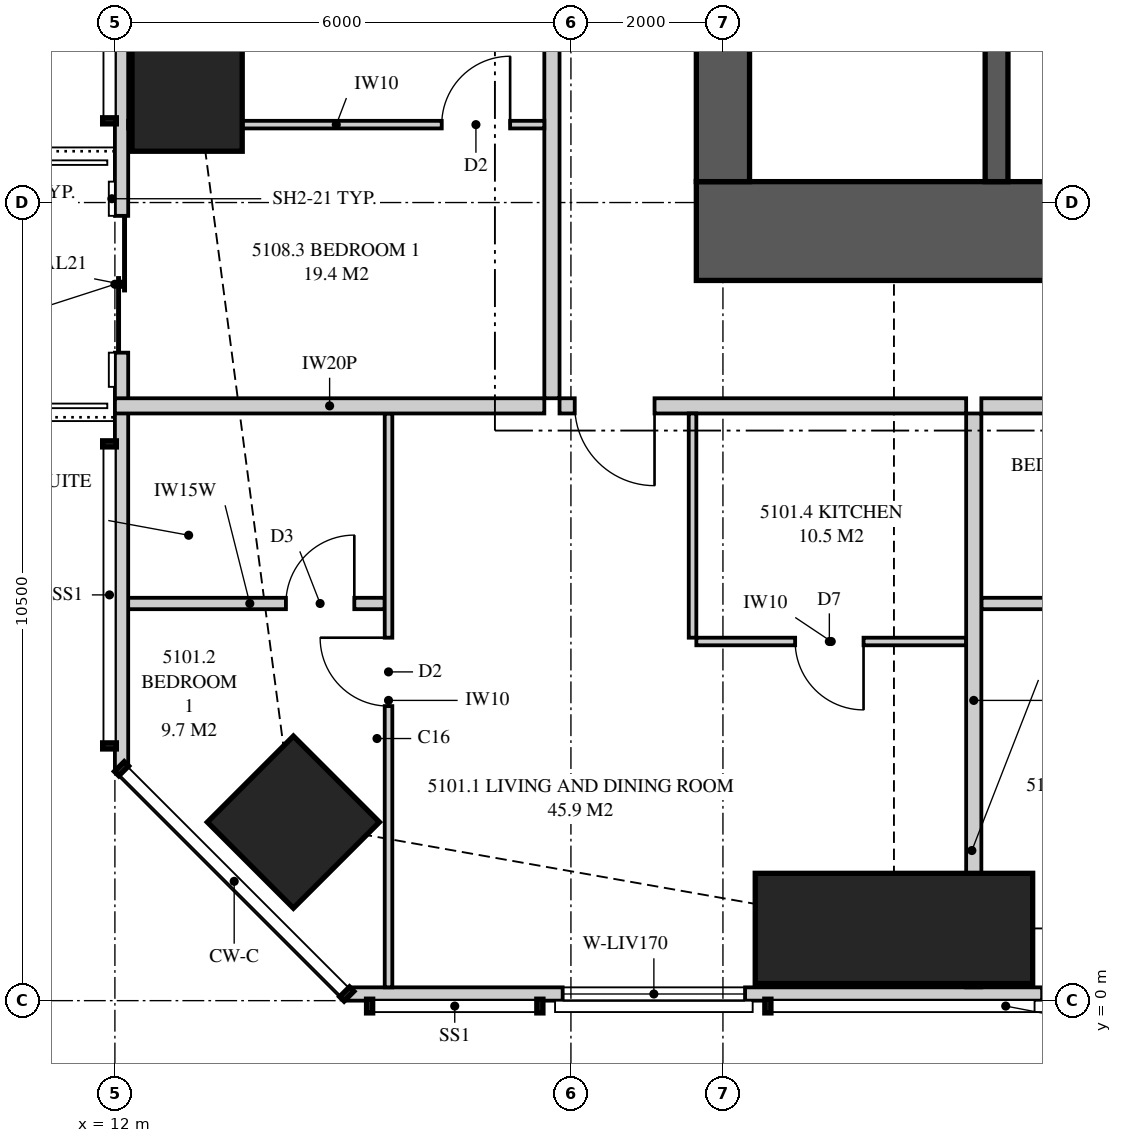
"""IFC4 building model, lengths in metres.
Left out: names, types, materials, properties, quantities, classifications, styles, units other than length and angle.
Written with IfcOpenShell. Run it as: python <this file> out.ifc"""

import sys

from ifc_helpers import new_model, si_unit, direction, frame, frame_2d, origin, origin_2d, place, context, subcontext, project, spatial, polyline, rectangle, outline, extrude, element, fill, save


model = new_model("IFC4")
c1 = context("Model", 3, precision=1e-05, world=origin(), true_north=direction((0.0, 1.0)))
c2 = subcontext(c1, "Body", "Model", "MODEL_VIEW")
j1 = project(units=[si_unit("LENGTHUNIT", "METRE"), si_unit("PLANEANGLEUNIT", "RADIAN")], contexts=[c1])
p1 = place(None, origin())
s1 = spatial("IfcSite", under=j1, at=p1, CompositionType="ELEMENT")
p2 = place(p1, origin())
s2 = spatial("IfcBuilding", under=s1, at=p2, CompositionType="ELEMENT")
p3 = place(p2, frame((0.0, 0.0, 187.85)))
s3 = spatial("IfcBuildingStorey", under=s2, at=p3, CompositionType="ELEMENT", Elevation=187.85)
p4 = place(p3, frame((14.348, 2.348, 0.0), z_axis=(0.0, 0.0, 1.0), x_axis=(0.707106781187, 0.707106781187, 0.0)))
e1 = element("IfcColumn", 1, at=p4, inside=s3, PredefinedType="COLUMN", context=c2, shape_type="SweptSolid", body=[
    extrude(rectangle(XDim=1.6, YDim=1.6, at=origin_2d()), origin(), (0.0, 0.0, 1.0), 3.35),
])
for number, where, z_axis, x_axis in (
    (2, (22.25, 0.95, 0.0), (0.0, 0.0, 1.0), (0.0, 1.0, 0.0)),
    (3, (12.95, 13.0, 0.0), (0.0, 0.0, 1.0), (1.0, 0.0, 0.0)),
):
    element("IfcColumn", number, at=place(p3, frame(where, z_axis=z_axis, x_axis=x_axis)), inside=s3, PredefinedType="COLUMN", context=c2, shape_type="SweptSolid", body=[
        extrude(rectangle(XDim=1.45, YDim=3.65, at=origin_2d()), origin(), (0.0, 0.0, 1.0), 3.35),
    ])
p5 = place(p3, frame((19.65, 10.125, 0.0), z_axis=(0.0, 0.0, 1.0), x_axis=(1.0, 0.0, 0.0)))
e4 = element("IfcWall", 4, at=p5, inside=s3, PredefinedType="SHEAR", context=c2, shape_type="SweptSolid", body=[
    extrude(rectangle(XDim=6.35, YDim=1.3, at=frame_2d((3.175, 0.0))), origin(), (0.0, 0.0, 1.0), 3.35),
])
p6 = place(p5, frame((4.775, 0.0, 0.0)))
e5 = element("IfcOpeningElement", 5, at=p6, cuts=e4, PredefinedType="OPENING", context=c2, shape_type="SweptSolid", body=[
    extrude(rectangle(XDim=0.75, YDim=2.1, at=frame_2d((0.375, 1.05))), frame((0.0, 0.66, 0.0), z_axis=(0.0, -1.0, 0.0), x_axis=(1.0, 0.0, 0.0)), (0.0, 0.0, 1.0), 1.32),
])
p7 = place(p3, frame((20.0, 13.0, 0.0), z_axis=(0.0, 0.0, 1.0), x_axis=(0.0, -1.0, 0.0)))
e6 = element("IfcWall", 6, at=p7, inside=s3, PredefinedType="SHEAR", context=c2, shape_type="SweptSolid", body=[
    extrude(rectangle(XDim=2.225, YDim=0.7, at=frame_2d((1.113, 0.0))), origin(), (0.0, 0.0, 1.0), 3.35),
])
p8 = place(p3, frame((23.6, 10.775, 0.0), z_axis=(0.0, 0.0, 1.0), x_axis=(0.0, 1.0, 0.0)))
e7 = element("IfcWall", 7, at=p8, inside=s3, PredefinedType="SHEAR", context=c2, shape_type="SweptSolid", body=[
    extrude(rectangle(XDim=6.925, YDim=0.3, at=frame_2d((3.462, 0.0))), origin(), (0.0, 0.0, 1.0), 3.35),
])
p9 = place(p3, frame((15.051, 0.087, 0.0), z_axis=(0.0, 0.0, 1.0), x_axis=(1.0, 0.0, 0.0)))
e8 = element("IfcWall", 8, at=p9, inside=s3, PredefinedType="SOLIDWALL", context=c2, shape_type="SweptSolid", body=[
    extrude(outline(polyline([(0.0, 0.0), (34.897, 0.0), (34.897, 3.11), (27.91, 3.11), (27.91, 2.15), (27.836, 2.15), (27.836, 3.11), (27.699, 3.11), (27.699, 2.15), (7.199, 2.15), (7.199, 3.11), (7.062, 3.11), (7.062, 2.15), (6.987, 2.15), (6.987, 3.11), (0.0, 3.11), (0.0, 0.0)])), frame((0.0, 0.087, 0.0), z_axis=(0.0, -1.0, 0.0), x_axis=(1.0, 0.0, 0.0)), (0.0, 0.0, 1.0), 0.175),
])
p10 = place(p9, frame((2.84, 0.0, 0.4)))
e9 = element("IfcOpeningElement", 9, at=p10, cuts=e8, PredefinedType="OPENING", context=c2, shape_type="SweptSolid", body=[
    extrude(rectangle(XDim=2.4, YDim=1.7, at=frame_2d((1.2, 0.85))), frame((0.0, 0.097, 0.0), z_axis=(0.0, -1.0, 0.0), x_axis=(1.0, 0.0, 0.0)), (0.0, 0.0, 1.0), 0.195),
])
p11 = place(p9, frame((9.149, 0.0, 0.4)))
e10 = element("IfcOpeningElement", 10, at=p11, cuts=e8, PredefinedType="OPENING", context=c2, shape_type="SweptSolid", body=[
    extrude(rectangle(XDim=1.8, YDim=1.7, at=frame_2d((0.9, 0.85))), frame((0.0, 0.097, 0.0), z_axis=(0.0, -1.0, 0.0), x_axis=(1.0, 0.0, 0.0)), (0.0, 0.0, 1.0), 0.195),
])
p12 = place(p9, frame((13.561, 0.0, 0.0)))
e11 = element("IfcOpeningElement", 11, at=p12, cuts=e8, PredefinedType="OPENING", context=c2, shape_type="SweptSolid", body=[
    extrude(rectangle(XDim=1.8, YDim=2.1, at=frame_2d((0.9, 1.05))), frame((0.0, 0.097, 0.0), z_axis=(0.0, -1.0, 0.0), x_axis=(1.0, 0.0, 0.0)), (0.0, 0.0, 1.0), 0.195),
])
p13 = place(p9, frame((19.849, 0.0, 0.4)))
e12 = element("IfcOpeningElement", 12, at=p13, cuts=e8, PredefinedType="OPENING", context=c2, shape_type="SweptSolid", body=[
    extrude(rectangle(XDim=1.8, YDim=1.7, at=frame_2d((0.9, 0.85))), frame((0.0, 0.097, 0.0), z_axis=(0.0, -1.0, 0.0), x_axis=(1.0, 0.0, 0.0)), (0.0, 0.0, 1.0), 0.195),
])
p14 = place(p9, frame((23.449, 0.0, 0.4)))
e13 = element("IfcOpeningElement", 13, at=p14, cuts=e8, PredefinedType="OPENING", context=c2, shape_type="SweptSolid", body=[
    extrude(rectangle(XDim=1.8, YDim=1.7, at=frame_2d((0.9, 0.85))), frame((0.0, 0.097, 0.0), z_axis=(0.0, -1.0, 0.0), x_axis=(1.0, 0.0, 0.0)), (0.0, 0.0, 1.0), 0.195),
])
p15 = place(p9, frame((29.636, 0.0, 0.4)))
e14 = element("IfcOpeningElement", 14, at=p15, cuts=e8, PredefinedType="OPENING", context=c2, shape_type="SweptSolid", body=[
    extrude(rectangle(XDim=1.8, YDim=1.7, at=frame_2d((0.9, 0.85))), frame((0.0, 0.097, 0.0), z_axis=(0.0, -1.0, 0.0), x_axis=(1.0, 0.0, 0.0)), (0.0, 0.0, 1.0), 0.195),
])
p16 = place(p9, frame((32.56, 0.0, 0.4)))
e15 = element("IfcOpeningElement", 15, at=p16, cuts=e8, PredefinedType="OPENING", context=c2, shape_type="SweptSolid", body=[
    extrude(rectangle(XDim=1.8, YDim=1.7, at=frame_2d((0.9, 0.85))), frame((0.0, 0.097, 0.0), z_axis=(0.0, -1.0, 0.0), x_axis=(1.0, 0.0, 0.0)), (0.0, 0.0, 1.0), 0.195),
])
p17 = place(p3, frame((12.087, 32.949, 0.0), z_axis=(0.0, 0.0, 1.0), x_axis=(0.0, -1.0, 0.0)))
e16 = element("IfcWall", 16, at=p17, inside=s3, PredefinedType="SOLIDWALL", context=c2, shape_type="SweptSolid", body=[
    extrude(outline(polyline([(0.0, 0.0), (29.897, 0.0), (29.897, 3.11), (20.191, 3.11), (20.191, 2.15), (20.051, 2.15), (20.051, 3.11), (19.949, 3.11), (19.949, 2.15), (7.949, 2.15), (7.949, 3.11), (7.823, 3.11), (7.823, 2.15), (7.73, 2.15), (7.73, 3.11), (0.0, 3.11), (0.0, 0.0)])), frame((0.0, 0.087, 0.0), z_axis=(0.0, -1.0, 0.0), x_axis=(1.0, 0.0, 0.0)), (0.0, 0.0, 1.0), 0.175),
])
p18 = place(p17, frame((1.599, 0.0, 0.4)))
e17 = element("IfcOpeningElement", 17, at=p18, cuts=e16, PredefinedType="OPENING", context=c2, shape_type="SweptSolid", body=[
    extrude(rectangle(XDim=1.2, YDim=1.7, at=frame_2d((0.6, 0.85))), frame((0.0, 0.097, 0.0), z_axis=(0.0, -1.0, 0.0), x_axis=(1.0, 0.0, 0.0)), (0.0, 0.0, 1.0), 0.195),
])
p19 = place(p17, frame((9.899, 0.0, 0.4)))
e18 = element("IfcOpeningElement", 18, at=p19, cuts=e16, PredefinedType="OPENING", context=c2, shape_type="SweptSolid", body=[
    extrude(rectangle(XDim=1.8, YDim=1.7, at=frame_2d((0.9, 0.85))), frame((0.0, 0.097, 0.0), z_axis=(0.0, -1.0, 0.0), x_axis=(1.0, 0.0, 0.0)), (0.0, 0.0, 1.0), 0.195),
])
p20 = place(p17, frame((13.024, 0.0, 0.4)))
e19 = element("IfcOpeningElement", 19, at=p20, cuts=e16, PredefinedType="OPENING", context=c2, shape_type="SweptSolid", body=[
    extrude(rectangle(XDim=1.8, YDim=1.7, at=frame_2d((0.9, 0.85))), frame((0.0, 0.097, 0.0), z_axis=(0.0, -1.0, 0.0), x_axis=(1.0, 0.0, 0.0)), (0.0, 0.0, 1.0), 0.195),
])
p21 = place(p17, frame((16.201, 0.0, 0.4)))
e20 = element("IfcOpeningElement", 20, at=p21, cuts=e16, PredefinedType="OPENING", context=c2, shape_type="SweptSolid", body=[
    extrude(rectangle(XDim=1.8, YDim=1.7, at=frame_2d((0.9, 0.85))), frame((0.0, 0.097, 0.0), z_axis=(0.0, -1.0, 0.0), x_axis=(1.0, 0.0, 0.0)), (0.0, 0.0, 1.0), 0.195),
])
p22 = place(p17, frame((22.624, 0.0, 0.0)))
e21 = element("IfcOpeningElement", 21, at=p22, cuts=e16, PredefinedType="OPENING", context=c2, shape_type="SweptSolid", body=[
    extrude(rectangle(XDim=1.8, YDim=2.1, at=frame_2d((0.9, 1.05))), frame((0.0, 0.097, 0.0), z_axis=(0.0, -1.0, 0.0), x_axis=(1.0, 0.0, 0.0)), (0.0, 0.0, 1.0), 0.195),
])
p23 = place(p3, frame((23.3, 0.175, 0.0), z_axis=(0.0, 0.0, 1.0), x_axis=(0.0, 1.0, 0.0)))
e22 = element("IfcWall", 22, at=p23, inside=s3, PredefinedType="PARTITIONING", context=c2, shape_type="SweptSolid", body=[
    extrude(outline(polyline([(0.529, 2.15), (0.0, 2.15), (0.0, 0.0), (0.529, 0.0), (0.529, 0.472), (1.021, 0.472), (1.021, 0.0), (7.55, 0.0), (7.55, 3.11), (1.685, 3.11), (1.685, 2.15), (1.021, 2.15), (1.021, 1.678), (0.529, 1.678), (0.529, 2.15)])), frame((0.0, 0.1, 0.0), z_axis=(0.0, -1.0, 0.0), x_axis=(1.0, 0.0, 0.0)), (0.0, 0.0, 1.0), 0.2),
])
p24 = place(p3, frame((17.85, 7.825, 0.0), z_axis=(0.0, 0.0, 1.0), x_axis=(1.0, 0.0, 0.0)))
e23 = element("IfcWall", 23, at=p24, inside=s3, PredefinedType="PARTITIONING", context=c2, shape_type="SweptSolid", body=[
    extrude(outline(polyline([(0.0, 0.0), (5.35, 0.0), (5.35, 3.11), (4.737, 3.11), (4.737, 2.541), (4.062, 2.541), (4.062, 3.11), (0.0, 3.11), (0.0, 0.0)])), frame((0.0, 0.1, 0.0), z_axis=(0.0, -1.0, 0.0), x_axis=(1.0, 0.0, 0.0)), (0.0, 0.0, 1.0), 0.2),
])
p25 = place(p24, frame((0.2, 0.0, 0.0)))
e24 = element("IfcOpeningElement", 24, at=p25, cuts=e23, PredefinedType="OPENING", context=c2, shape_type="SweptSolid", body=[
    extrude(rectangle(XDim=1.05, YDim=2.2, at=frame_2d((0.525, 1.1))), frame((0.0, 0.11, 0.0), z_axis=(0.0, -1.0, 0.0), x_axis=(1.0, 0.0, 0.0)), (0.0, 0.0, 1.0), 0.22),
])
p26 = place(p3, frame((15.6, 0.175, 0.0), z_axis=(0.0, 0.0, 1.0), x_axis=(0.0, 1.0, 0.0)))
e25 = element("IfcWall", 25, at=p26, inside=s3, PredefinedType="PARTITIONING", context=c2, shape_type="SweptSolid", body=[
    extrude(outline(polyline([(0.0, 0.0), (7.55, 0.0), (7.55, 3.11), (2.825, 3.11), (2.825, 2.15), (1.079, 2.15), (1.079, 3.11), (0.0, 3.11), (0.0, 0.0)])), frame((0.0, 0.05, 0.0), z_axis=(0.0, -1.0, 0.0), x_axis=(1.0, 0.0, 0.0)), (0.0, 0.0, 1.0), 0.1),
])
p27 = place(p26, frame((3.7, 0.0, 0.0)))
e26 = element("IfcOpeningElement", 26, at=p27, cuts=e25, PredefinedType="OPENING", context=c2, shape_type="SweptSolid", body=[
    extrude(rectangle(XDim=0.9, YDim=2.1, at=frame_2d((0.45, 1.05))), frame((0.0, 0.06, 0.0), z_axis=(0.0, -1.0, 0.0), x_axis=(1.0, 0.0, 0.0)), (0.0, 0.0, 1.0), 0.12),
])
p28 = place(p3, frame((12.0, 5.225, 0.0), z_axis=(0.0, 0.0, 1.0), x_axis=(1.0, 0.0, 0.0)))
e27 = element("IfcWall", 27, at=p28, inside=s3, PredefinedType="PLUMBINGWALL", context=c2, shape_type="SweptSolid", body=[
    extrude(outline(polyline([(0.0, 0.0), (3.55, 0.0), (3.55, 3.11), (2.863, 3.11), (2.863, 2.15), (1.078, 2.15), (1.078, 3.11), (0.0, 3.11), (0.0, 0.0)])), frame((0.0, 0.075, 0.0), z_axis=(0.0, -1.0, 0.0), x_axis=(1.0, 0.0, 0.0)), (0.0, 0.0, 1.0), 0.15),
])
p29 = place(p28, frame((2.25, 0.0, 0.0)))
e28 = element("IfcOpeningElement", 28, at=p29, cuts=e27, PredefinedType="OPENING", context=c2, shape_type="SweptSolid", body=[
    extrude(rectangle(XDim=0.9, YDim=2.1, at=frame_2d((0.45, 1.05))), frame((0.0, 0.085, 0.0), z_axis=(0.0, -1.0, 0.0), x_axis=(1.0, 0.0, 0.0)), (0.0, 0.0, 1.0), 0.17),
])
p30 = place(p3, frame((19.65, 4.725, 0.0), z_axis=(0.0, 0.0, 1.0), x_axis=(1.0, 0.0, 0.0)))
e29 = element("IfcWall", 29, at=p30, inside=s3, PredefinedType="PARTITIONING", context=c2, shape_type="SweptSolid", body=[
    extrude(outline(polyline([(0.0, 0.0), (3.55, 0.0), (3.55, 3.11), (2.887, 3.11), (2.887, 2.541), (2.312, 2.541), (2.312, 3.11), (0.0, 3.11), (0.0, 0.0)])), frame((0.0, 0.05, 0.0), z_axis=(0.0, -1.0, 0.0), x_axis=(1.0, 0.0, 0.0)), (0.0, 0.0, 1.0), 0.1),
])
p31 = place(p30, frame((1.3, 0.0, 0.0)))
e30 = element("IfcOpeningElement", 30, at=p31, cuts=e29, PredefinedType="OPENING", context=c2, shape_type="SweptSolid", body=[
    extrude(rectangle(XDim=0.9, YDim=2.1, at=frame_2d((0.45, 1.05))), frame((0.0, 0.06, 0.0), z_axis=(0.0, -1.0, 0.0), x_axis=(1.0, 0.0, 0.0)), (0.0, 0.0, 1.0), 0.12),
])
p32 = place(p3, frame((19.6, 4.775, 0.0), z_axis=(0.0, 0.0, 1.0), x_axis=(0.0, 1.0, 0.0)))
e31 = element("IfcWall", 31, at=p32, inside=s3, PredefinedType="PARTITIONING", context=c2, shape_type="SweptSolid", body=[
    extrude(rectangle(XDim=2.95, YDim=0.1, at=frame_2d((1.475, 0.0))), origin(), (0.0, 0.0, 1.0), 3.11),
])
p33 = place(p3, frame((23.4, 7.825, 0.0), z_axis=(0.0, 0.0, 1.0), x_axis=(1.0, 0.0, 0.0)))
e32 = element("IfcWall", 32, at=p33, inside=s3, PredefinedType="PARTITIONING", context=c2, shape_type="SweptSolid", body=[
    extrude(rectangle(XDim=3.85, YDim=0.2, at=frame_2d((1.925, 0.0))), origin(), (0.0, 0.0, 1.0), 3.11),
])
p34 = place(p3, frame((23.4, 5.225, 0.0), z_axis=(0.0, 0.0, 1.0), x_axis=(1.0, 0.0, 0.0)))
e33 = element("IfcWall", 33, at=p34, inside=s3, PredefinedType="PLUMBINGWALL", context=c2, shape_type="SweptSolid", body=[
    extrude(rectangle(XDim=3.45, YDim=0.15, at=frame_2d((1.725, 0.0))), origin(), (0.0, 0.0, 1.0), 3.11),
])
p35 = place(p34, frame((2.15, 0.0, 0.0)))
e34 = element("IfcOpeningElement", 34, at=p35, cuts=e33, PredefinedType="OPENING", context=c2, shape_type="SweptSolid", body=[
    extrude(rectangle(XDim=0.9, YDim=2.1, at=frame_2d((0.45, 1.05))), frame((0.0, 0.085, 0.0), z_axis=(0.0, -1.0, 0.0), x_axis=(1.0, 0.0, 0.0)), (0.0, 0.0, 1.0), 0.17),
])
p36 = place(p3, frame((12.0, 7.825, 0.0), z_axis=(0.0, 0.0, 1.0), x_axis=(1.0, 0.0, 0.0)))
e35 = element("IfcWall", 35, at=p36, inside=s3, PredefinedType="PARTITIONING", context=c2, shape_type="SweptSolid", body=[
    extrude(outline(polyline([(0.0, 0.0), (5.65, 0.0), (5.65, 3.11), (2.547, 3.11), (2.547, 2.15), (0.712, 2.15), (0.712, 3.11), (0.0, 3.11), (0.0, 0.0)])), frame((0.0, 0.1, 0.0), z_axis=(0.0, -1.0, 0.0), x_axis=(1.0, 0.0, 0.0)), (0.0, 0.0, 1.0), 0.2),
])
p37 = place(p3, frame((17.75, 7.925, 0.0), z_axis=(0.0, 0.0, 1.0), x_axis=(0.0, 1.0, 0.0)))
e36 = element("IfcWall", 36, at=p37, inside=s3, PredefinedType="PARTITIONING", context=c2, shape_type="SweptSolid", body=[
    extrude(outline(polyline([(0.0, 0.0), (21.15, 0.0), (21.15, 3.11), (17.412, 3.11), (17.412, 2.541), (16.738, 2.541), (16.738, 3.11), (5.412, 3.11), (5.412, 2.541), (4.738, 2.541), (4.738, 3.11), (0.0, 3.11), (0.0, 0.0)])), frame((0.0, 0.1, 0.0), z_axis=(0.0, -1.0, 0.0), x_axis=(1.0, 0.0, 0.0)), (0.0, 0.0, 1.0), 0.2),
])
p38 = place(p37, frame((16.25, 0.0, 0.0)))
e37 = element("IfcOpeningElement", 37, at=p38, cuts=e36, PredefinedType="OPENING", context=c2, shape_type="SweptSolid", body=[
    extrude(rectangle(XDim=1.05, YDim=2.2, at=frame_2d((0.525, 1.1))), frame((0.0, 0.11, 0.0), z_axis=(0.0, -1.0, 0.0), x_axis=(1.0, 0.0, 0.0)), (0.0, 0.0, 1.0), 0.22),
])
p39 = place(p3, frame((12.175, 11.525, 0.0), z_axis=(0.0, 0.0, 1.0), x_axis=(1.0, 0.0, 0.0)))
e38 = element("IfcWall", 38, at=p39, inside=s3, PredefinedType="PARTITIONING", context=c2, shape_type="SweptSolid", body=[
    extrude(outline(polyline([(0.0, 0.0), (5.475, 0.0), (5.475, 3.11), (1.836, 3.11), (1.836, 2.15), (0.101, 2.15), (0.101, 3.11), (0.0, 3.11), (0.0, 0.0)])), frame((0.0, 0.05, 0.0), z_axis=(0.0, -1.0, 0.0), x_axis=(1.0, 0.0, 0.0)), (0.0, 0.0, 1.0), 0.1),
])
p40 = place(p39, frame((4.125, 0.0, 0.0)))
e39 = element("IfcOpeningElement", 39, at=p40, cuts=e38, PredefinedType="OPENING", context=c2, shape_type="SweptSolid", body=[
    extrude(rectangle(XDim=0.9, YDim=2.1, at=frame_2d((0.45, 1.05))), frame((0.0, 0.06, 0.0), z_axis=(0.0, -1.0, 0.0), x_axis=(1.0, 0.0, 0.0)), (0.0, 0.0, 1.0), 0.12),
])
p41 = place(p10, origin())
e40 = element("IfcWindow", 40, at=p41, inside=s3, PartitioningType="SINGLE_PANEL", PredefinedType="WINDOW", context=c2, shape_type="SweptSolid", body=[
    extrude(rectangle(XDim=2.4, YDim=1.7, at=frame_2d((1.2, 0.85))), frame((0.0, 0.03, 0.0), z_axis=(0.0, -1.0, 0.0), x_axis=(1.0, 0.0, 0.0)), (0.0, 0.0, 1.0), 0.06),
])
fill(e9, e40)
p42 = place(p11, origin())
e41 = element("IfcWindow", 41, at=p42, inside=s3, PartitioningType="SINGLE_PANEL", PredefinedType="WINDOW", context=c2, shape_type="SweptSolid", body=[
    extrude(rectangle(XDim=1.8, YDim=1.7, at=frame_2d((0.9, 0.85))), frame((0.0, 0.03, 0.0), z_axis=(0.0, -1.0, 0.0), x_axis=(1.0, 0.0, 0.0)), (0.0, 0.0, 1.0), 0.06),
])
fill(e10, e41)
p43 = place(p22, origin())
e42 = element("IfcDoor", 42, at=p43, inside=s3, OperationType="SLIDING_TO_LEFT", PredefinedType="DOOR", context=c2, shape_type="SweptSolid", body=[
    extrude(rectangle(XDim=1.8, YDim=2.1, at=frame_2d((0.9, 1.05))), frame((0.0, 0.025, 0.0), z_axis=(0.0, -1.0, 0.0), x_axis=(1.0, 0.0, 0.0)), (0.0, 0.0, 1.0), 0.05),
])
fill(e21, e42)
p44 = place(p25, frame((1.05, 0.0, 0.0), z_axis=(0.0, 0.0, 1.0), x_axis=(-1.0, 0.0, 0.0)))
e43 = element("IfcDoor", 43, at=p44, inside=s3, OperationType="SINGLE_SWING_LEFT", PredefinedType="DOOR", context=c2, shape_type="SweptSolid", body=[
    extrude(rectangle(XDim=1.05, YDim=2.2, at=frame_2d((0.525, 1.1))), frame((0.0, 0.025, 0.0), z_axis=(0.0, -1.0, 0.0), x_axis=(1.0, 0.0, 0.0)), (0.0, 0.0, 1.0), 0.05),
])
fill(e24, e43)
p45 = place(p27, origin())
e44 = element("IfcDoor", 44, at=p45, inside=s3, OperationType="SINGLE_SWING_RIGHT", PredefinedType="DOOR", context=c2, shape_type="SweptSolid", body=[
    extrude(rectangle(XDim=0.9, YDim=2.1, at=frame_2d((0.45, 1.05))), frame((0.0, 0.025, 0.0), z_axis=(0.0, -1.0, 0.0), x_axis=(1.0, 0.0, 0.0)), (0.0, 0.0, 1.0), 0.05),
])
fill(e26, e44)
p46 = place(p29, origin())
e45 = element("IfcDoor", 45, at=p46, inside=s3, OperationType="SINGLE_SWING_RIGHT", PredefinedType="DOOR", context=c2, shape_type="SweptSolid", body=[
    extrude(rectangle(XDim=0.9, YDim=2.1, at=frame_2d((0.45, 1.05))), frame((0.0, 0.025, 0.0), z_axis=(0.0, -1.0, 0.0), x_axis=(1.0, 0.0, 0.0)), (0.0, 0.0, 1.0), 0.05),
])
fill(e28, e45)
p47 = place(p31, frame((0.9, 0.0, 0.0), z_axis=(0.0, 0.0, 1.0), x_axis=(-1.0, 0.0, 0.0)))
e46 = element("IfcDoor", 46, at=p47, inside=s3, OperationType="SINGLE_SWING_LEFT", PredefinedType="DOOR", context=c2, shape_type="SweptSolid", body=[
    extrude(rectangle(XDim=0.9, YDim=2.1, at=frame_2d((0.45, 1.05))), frame((0.0, 0.025, 0.0), z_axis=(0.0, -1.0, 0.0), x_axis=(1.0, 0.0, 0.0)), (0.0, 0.0, 1.0), 0.05),
])
fill(e30, e46)
p48 = place(p40, origin())
e47 = element("IfcDoor", 47, at=p48, inside=s3, OperationType="SINGLE_SWING_RIGHT", PredefinedType="DOOR", context=c2, shape_type="SweptSolid", body=[
    extrude(rectangle(XDim=0.9, YDim=2.1, at=frame_2d((0.45, 1.05))), frame((0.0, 0.025, 0.0), z_axis=(0.0, -1.0, 0.0), x_axis=(1.0, 0.0, 0.0)), (0.0, 0.0, 1.0), 0.05),
])
fill(e39, e47)
save(model, sys.argv[1])
